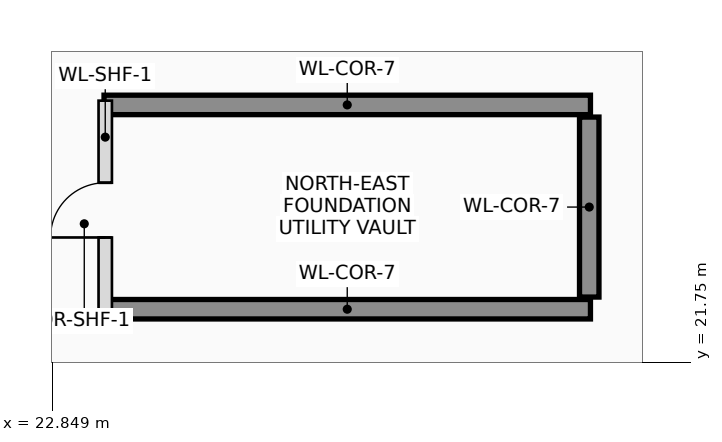
"""IFC4 building model, lengths in metres.
Left out: names, types, materials, properties, quantities, classifications, styles, units other than length and angle.
Written with IfcOpenShell. Run it as: python <this file> out.ifc"""

import sys

from ifc_helpers import new_model, si_unit, direction, frame, frame_2d, origin, place, context, subcontext, project, spatial, rectangle, extrude, element, fill, save


model = new_model("IFC4")
c1 = context("Model", 3, precision=1e-05, world=origin(), true_north=direction((0.0, 1.0)))
c2 = subcontext(c1, "Body", "Model", "MODEL_VIEW")
j1 = project(units=[si_unit("LENGTHUNIT", "METRE"), si_unit("PLANEANGLEUNIT", "RADIAN")], contexts=[c1])
p1 = place(None, origin())
s1 = spatial("IfcSite", under=j1, at=p1, CompositionType="ELEMENT")
p2 = place(p1, origin())
s2 = spatial("IfcBuilding", under=s1, at=p2, CompositionType="ELEMENT")
p3 = place(p2, frame((0.0, 0.0, -4.8)))
s3 = spatial("IfcBuildingStorey", under=s2, at=p3, CompositionType="ELEMENT", Elevation=-4.8)
for number, where, z_axis, x_axis in (
    (1, (23.7, 25.98, 0.0), (0.0, 0.0, 1.0), (1.0, 0.0, 0.0)),
    (2, (23.7, 22.62, 0.0), (0.0, 0.0, 1.0), (1.0, 0.0, 0.0)),
):
    element("IfcWall", number, at=place(p3, frame(where, z_axis=z_axis, x_axis=x_axis)), inside=s3, PredefinedType="SHEAR", context=c2, shape_type="SweptSolid", body=[
        extrude(rectangle(XDim=8.0, YDim=0.32, at=frame_2d((4.0, 0.0))), origin(), (0.0, 0.0, 1.0), 4.8),
    ])
p4 = place(p3, frame((31.68, 22.82, 0.0), z_axis=(0.0, 0.0, 1.0), x_axis=(0.0, 1.0, 0.0)))
e3 = element("IfcWall", 3, at=p4, inside=s3, PredefinedType="SHEAR", context=c2, shape_type="SweptSolid", body=[
    extrude(rectangle(XDim=2.96, YDim=0.32, at=frame_2d((1.48, 0.0))), origin(), (0.0, 0.0, 1.0), 4.8),
])
p5 = place(p3, frame((23.72, 22.55, 0.0), z_axis=(0.0, 0.0, 1.0), x_axis=(0.0, 1.0, 0.0)))
e4 = element("IfcWall", 4, at=p5, inside=s3, PredefinedType="PLUMBINGWALL", context=c2, shape_type="SweptSolid", body=[
    extrude(rectangle(XDim=3.5, YDim=0.22, at=frame_2d((1.75, 0.0))), origin(), (0.0, 0.0, 1.0), 4.54),
])
p6 = place(p5, frame((1.25, 0.0, 0.0)))
e5 = element("IfcOpeningElement", 5, at=p6, cuts=e4, PredefinedType="OPENING", context=c2, shape_type="SweptSolid", body=[
    extrude(rectangle(XDim=0.9, YDim=2.05, at=frame_2d((0.45, 1.025))), frame((0.0, 0.12, 0.0), z_axis=(0.0, -1.0, 0.0), x_axis=(1.0, 0.0, 0.0)), (0.0, 0.0, 1.0), 0.24),
])
p7 = place(p6, origin())
e6 = element("IfcDoor", 6, at=p7, inside=s3, OperationType="SINGLE_SWING_LEFT", PredefinedType="DOOR", context=c2, shape_type="SweptSolid", body=[
    extrude(rectangle(XDim=0.9, YDim=2.05, at=frame_2d((0.45, 1.025))), frame((0.0, 0.025, 0.0), z_axis=(0.0, -1.0, 0.0), x_axis=(1.0, 0.0, 0.0)), (0.0, 0.0, 1.0), 0.05),
])
fill(e5, e6)
save(model, sys.argv[1])
